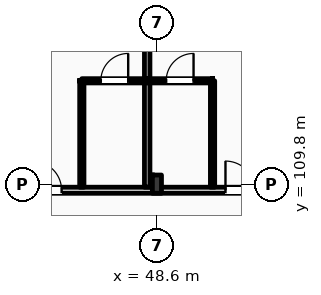
"""IFC4 building model, lengths in metres.
Left out: names, types, materials, properties, quantities, classifications, styles, units other than length and angle.
Written with IfcOpenShell. Run it as: python <this file> out.ifc"""

import sys

from ifc_helpers import new_model, si_unit, direction, frame, frame_2d, origin, origin_2d, place, context, subcontext, project, spatial, rectangle, i_section, extrude, element, fill, save


model = new_model("IFC4")
c1 = context("Model", 3, precision=1e-05, world=origin(), true_north=direction((0.0, 1.0)))
c2 = subcontext(c1, "Body", "Model", "MODEL_VIEW")
j1 = project(units=[si_unit("LENGTHUNIT", "METRE"), si_unit("PLANEANGLEUNIT", "RADIAN")], contexts=[c1])
p1 = place(None, origin())
s1 = spatial("IfcSite", under=j1, at=p1, CompositionType="ELEMENT")
p2 = place(p1, origin())
s2 = spatial("IfcBuilding", under=s1, at=p2, CompositionType="ELEMENT")
p3 = place(p2, frame((0.0, 0.0, 20.4)))
s3 = spatial("IfcBuildingStorey", under=s2, at=p3, CompositionType="ELEMENT", Elevation=20.4)
p4 = place(p3, frame((48.6, 109.8, 0.0), z_axis=(0.0, 0.0, 1.0), x_axis=(1.0, 0.0, 0.0)))
e1 = element("IfcColumn", 1, at=p4, inside=s3, PredefinedType="COLUMN", context=c2, shape_type="SweptSolid", body=[
    extrude(i_section(OverallWidth=0.3, OverallDepth=0.6, WebThickness=0.015, FlangeThickness=0.03, FilletRadius=0.027, at=origin_2d()), origin(), (0.0, 0.0, 1.0), 4.2),
])
p5 = place(p3, frame((10.65, 109.6, 0.0), z_axis=(0.0, 0.0, 1.0), x_axis=(1.0, 0.0, 0.0)))
e2 = element("IfcWall", 2, at=p5, inside=s3, PredefinedType="PARTITIONING", context=c2, shape_type="SweptSolid", body=[
    extrude(rectangle(XDim=109.21, YDim=0.2, at=frame_2d((54.605, 0.0))), origin(), (0.0, 0.0, 1.0), 3.38),
])
p6 = place(p5, frame((12.535, 0.0, 0.0)))
e3 = element("IfcOpeningElement", 3, at=p6, cuts=e2, PredefinedType="OPENING", context=c2, shape_type="SweptSolid", body=[
    extrude(rectangle(XDim=1.02, YDim=2.2, at=frame_2d((0.51, 1.1))), frame((0.0, 0.11, 0.0), z_axis=(0.0, -1.0, 0.0), x_axis=(1.0, 0.0, 0.0)), (0.0, 0.0, 1.0), 0.22),
])
p7 = place(p5, frame((19.175, 0.0, 0.0)))
e4 = element("IfcOpeningElement", 4, at=p7, cuts=e2, PredefinedType="OPENING", context=c2, shape_type="SweptSolid", body=[
    extrude(rectangle(XDim=1.02, YDim=2.2, at=frame_2d((0.51, 1.1))), frame((0.0, 0.11, 0.0), z_axis=(0.0, -1.0, 0.0), x_axis=(1.0, 0.0, 0.0)), (0.0, 0.0, 1.0), 0.22),
])
p8 = place(p5, frame((23.375, 0.0, 0.0)))
e5 = element("IfcOpeningElement", 5, at=p8, cuts=e2, PredefinedType="OPENING", context=c2, shape_type="SweptSolid", body=[
    extrude(rectangle(XDim=1.02, YDim=2.2, at=frame_2d((0.51, 1.1))), frame((0.0, 0.11, 0.0), z_axis=(0.0, -1.0, 0.0), x_axis=(1.0, 0.0, 0.0)), (0.0, 0.0, 1.0), 0.22),
])
p9 = place(p5, frame((27.575, 0.0, 0.0)))
e6 = element("IfcOpeningElement", 6, at=p9, cuts=e2, PredefinedType="OPENING", context=c2, shape_type="SweptSolid", body=[
    extrude(rectangle(XDim=1.02, YDim=2.2, at=frame_2d((0.51, 1.1))), frame((0.0, 0.11, 0.0), z_axis=(0.0, -1.0, 0.0), x_axis=(1.0, 0.0, 0.0)), (0.0, 0.0, 1.0), 0.22),
])
p10 = place(p5, frame((31.805, 0.0, 0.0)))
e7 = element("IfcOpeningElement", 7, at=p10, cuts=e2, PredefinedType="OPENING", context=c2, shape_type="SweptSolid", body=[
    extrude(rectangle(XDim=0.96, YDim=2.2, at=frame_2d((0.48, 1.1))), frame((0.0, 0.11, 0.0), z_axis=(0.0, -1.0, 0.0), x_axis=(1.0, 0.0, 0.0)), (0.0, 0.0, 1.0), 0.22),
])
p11 = place(p5, frame((33.855, 0.0, 0.0)))
e8 = element("IfcOpeningElement", 8, at=p11, cuts=e2, PredefinedType="OPENING", context=c2, shape_type="SweptSolid", body=[
    extrude(rectangle(XDim=0.96, YDim=2.2, at=frame_2d((0.48, 1.1))), frame((0.0, 0.11, 0.0), z_axis=(0.0, -1.0, 0.0), x_axis=(1.0, 0.0, 0.0)), (0.0, 0.0, 1.0), 0.22),
])
p12 = place(p5, frame((40.205, 0.0, 0.0)))
e9 = element("IfcOpeningElement", 9, at=p12, cuts=e2, PredefinedType="OPENING", context=c2, shape_type="SweptSolid", body=[
    extrude(rectangle(XDim=0.96, YDim=2.2, at=frame_2d((0.48, 1.1))), frame((0.0, 0.11, 0.0), z_axis=(0.0, -1.0, 0.0), x_axis=(1.0, 0.0, 0.0)), (0.0, 0.0, 1.0), 0.22),
])
p13 = place(p5, frame((42.255, 0.0, 0.0)))
e10 = element("IfcOpeningElement", 10, at=p13, cuts=e2, PredefinedType="OPENING", context=c2, shape_type="SweptSolid", body=[
    extrude(rectangle(XDim=0.96, YDim=2.2, at=frame_2d((0.48, 1.1))), frame((0.0, 0.11, 0.0), z_axis=(0.0, -1.0, 0.0), x_axis=(1.0, 0.0, 0.0)), (0.0, 0.0, 1.0), 0.22),
])
p14 = place(p5, frame((48.605, 0.0, 0.0)))
e11 = element("IfcOpeningElement", 11, at=p14, cuts=e2, PredefinedType="OPENING", context=c2, shape_type="SweptSolid", body=[
    extrude(rectangle(XDim=0.96, YDim=2.2, at=frame_2d((0.48, 1.1))), frame((0.0, 0.11, 0.0), z_axis=(0.0, -1.0, 0.0), x_axis=(1.0, 0.0, 0.0)), (0.0, 0.0, 1.0), 0.22),
])
p15 = place(p5, frame((50.655, 0.0, 0.0)))
e12 = element("IfcOpeningElement", 12, at=p15, cuts=e2, PredefinedType="OPENING", context=c2, shape_type="SweptSolid", body=[
    extrude(rectangle(XDim=0.96, YDim=2.2, at=frame_2d((0.48, 1.1))), frame((0.0, 0.11, 0.0), z_axis=(0.0, -1.0, 0.0), x_axis=(1.0, 0.0, 0.0)), (0.0, 0.0, 1.0), 0.22),
])
p16 = place(p5, frame((57.005, 0.0, 0.0)))
e13 = element("IfcOpeningElement", 13, at=p16, cuts=e2, PredefinedType="OPENING", context=c2, shape_type="SweptSolid", body=[
    extrude(rectangle(XDim=0.96, YDim=2.2, at=frame_2d((0.48, 1.1))), frame((0.0, 0.11, 0.0), z_axis=(0.0, -1.0, 0.0), x_axis=(1.0, 0.0, 0.0)), (0.0, 0.0, 1.0), 0.22),
])
p17 = place(p5, frame((59.055, 0.0, 0.0)))
e14 = element("IfcOpeningElement", 14, at=p17, cuts=e2, PredefinedType="OPENING", context=c2, shape_type="SweptSolid", body=[
    extrude(rectangle(XDim=0.96, YDim=2.2, at=frame_2d((0.48, 1.1))), frame((0.0, 0.11, 0.0), z_axis=(0.0, -1.0, 0.0), x_axis=(1.0, 0.0, 0.0)), (0.0, 0.0, 1.0), 0.22),
])
p18 = place(p5, frame((65.405, 0.0, 0.0)))
e15 = element("IfcOpeningElement", 15, at=p18, cuts=e2, PredefinedType="OPENING", context=c2, shape_type="SweptSolid", body=[
    extrude(rectangle(XDim=0.96, YDim=2.2, at=frame_2d((0.48, 1.1))), frame((0.0, 0.11, 0.0), z_axis=(0.0, -1.0, 0.0), x_axis=(1.0, 0.0, 0.0)), (0.0, 0.0, 1.0), 0.22),
])
p19 = place(p5, frame((67.205, 0.0, 0.0)))
e16 = element("IfcOpeningElement", 16, at=p19, cuts=e2, PredefinedType="OPENING", context=c2, shape_type="SweptSolid", body=[
    extrude(rectangle(XDim=0.96, YDim=2.2, at=frame_2d((0.48, 1.1))), frame((0.0, 0.11, 0.0), z_axis=(0.0, -1.0, 0.0), x_axis=(1.0, 0.0, 0.0)), (0.0, 0.0, 1.0), 0.22),
])
p20 = place(p5, frame((73.805, 0.0, 0.0)))
e17 = element("IfcOpeningElement", 17, at=p20, cuts=e2, PredefinedType="OPENING", context=c2, shape_type="SweptSolid", body=[
    extrude(rectangle(XDim=0.96, YDim=2.2, at=frame_2d((0.48, 1.1))), frame((0.0, 0.11, 0.0), z_axis=(0.0, -1.0, 0.0), x_axis=(1.0, 0.0, 0.0)), (0.0, 0.0, 1.0), 0.22),
])
p21 = place(p5, frame((78.255, 0.0, 0.0)))
e18 = element("IfcOpeningElement", 18, at=p21, cuts=e2, PredefinedType="OPENING", context=c2, shape_type="SweptSolid", body=[
    extrude(rectangle(XDim=0.96, YDim=2.2, at=frame_2d((0.48, 1.1))), frame((0.0, 0.11, 0.0), z_axis=(0.0, -1.0, 0.0), x_axis=(1.0, 0.0, 0.0)), (0.0, 0.0, 1.0), 0.22),
])
p22 = place(p5, frame((82.205, 0.0, 0.0)))
e19 = element("IfcOpeningElement", 19, at=p22, cuts=e2, PredefinedType="OPENING", context=c2, shape_type="SweptSolid", body=[
    extrude(rectangle(XDim=0.96, YDim=2.2, at=frame_2d((0.48, 1.1))), frame((0.0, 0.11, 0.0), z_axis=(0.0, -1.0, 0.0), x_axis=(1.0, 0.0, 0.0)), (0.0, 0.0, 1.0), 0.22),
])
p23 = place(p5, frame((86.405, 0.0, 0.0)))
e20 = element("IfcOpeningElement", 20, at=p23, cuts=e2, PredefinedType="OPENING", context=c2, shape_type="SweptSolid", body=[
    extrude(rectangle(XDim=0.96, YDim=2.2, at=frame_2d((0.48, 1.1))), frame((0.0, 0.11, 0.0), z_axis=(0.0, -1.0, 0.0), x_axis=(1.0, 0.0, 0.0)), (0.0, 0.0, 1.0), 0.22),
])
p24 = place(p5, frame((90.605, 0.0, 0.0)))
e21 = element("IfcOpeningElement", 21, at=p24, cuts=e2, PredefinedType="OPENING", context=c2, shape_type="SweptSolid", body=[
    extrude(rectangle(XDim=0.96, YDim=2.2, at=frame_2d((0.48, 1.1))), frame((0.0, 0.11, 0.0), z_axis=(0.0, -1.0, 0.0), x_axis=(1.0, 0.0, 0.0)), (0.0, 0.0, 1.0), 0.22),
])
p25 = place(p5, frame((94.805, 0.0, 0.0)))
e22 = element("IfcOpeningElement", 22, at=p25, cuts=e2, PredefinedType="OPENING", context=c2, shape_type="SweptSolid", body=[
    extrude(rectangle(XDim=0.96, YDim=2.2, at=frame_2d((0.48, 1.1))), frame((0.0, 0.11, 0.0), z_axis=(0.0, -1.0, 0.0), x_axis=(1.0, 0.0, 0.0)), (0.0, 0.0, 1.0), 0.22),
])
p26 = place(p5, frame((99.005, 0.0, 0.0)))
e23 = element("IfcOpeningElement", 23, at=p26, cuts=e2, PredefinedType="OPENING", context=c2, shape_type="SweptSolid", body=[
    extrude(rectangle(XDim=0.96, YDim=2.2, at=frame_2d((0.48, 1.1))), frame((0.0, 0.11, 0.0), z_axis=(0.0, -1.0, 0.0), x_axis=(1.0, 0.0, 0.0)), (0.0, 0.0, 1.0), 0.22),
])
p27 = place(p5, frame((103.205, 0.0, 0.0)))
e24 = element("IfcOpeningElement", 24, at=p27, cuts=e2, PredefinedType="OPENING", context=c2, shape_type="SweptSolid", body=[
    extrude(rectangle(XDim=0.96, YDim=2.2, at=frame_2d((0.48, 1.1))), frame((0.0, 0.11, 0.0), z_axis=(0.0, -1.0, 0.0), x_axis=(1.0, 0.0, 0.0)), (0.0, 0.0, 1.0), 0.22),
])
p28 = place(p5, frame((105.335, 0.0, 0.0)))
e25 = element("IfcOpeningElement", 25, at=p28, cuts=e2, PredefinedType="OPENING", context=c2, shape_type="SweptSolid", body=[
    extrude(rectangle(XDim=0.96, YDim=2.2, at=frame_2d((0.48, 1.1))), frame((0.0, 0.11, 0.0), z_axis=(0.0, -1.0, 0.0), x_axis=(1.0, 0.0, 0.0)), (0.0, 0.0, 1.0), 0.22),
])
p29 = place(p5, frame((2.716, 0.0, 0.0)))
e26 = element("IfcOpeningElement", 26, at=p29, cuts=e2, PredefinedType="OPENING", context=c2, shape_type="SweptSolid", body=[
    extrude(rectangle(XDim=1.35, YDim=2.25, at=frame_2d((0.675, 1.125))), frame((0.0, 0.11, 0.0), z_axis=(0.0, -1.0, 0.0), x_axis=(1.0, 0.0, 0.0)), (0.0, 0.0, 1.0), 0.22),
])
p30 = place(p5, frame((6.65, 0.0, 0.0)))
e27 = element("IfcOpeningElement", 27, at=p30, cuts=e2, PredefinedType="OPENING", context=c2, shape_type="SweptSolid", body=[
    extrude(rectangle(XDim=1.35, YDim=2.25, at=frame_2d((0.675, 1.125))), frame((0.0, 0.11, 0.0), z_axis=(0.0, -1.0, 0.0), x_axis=(1.0, 0.0, 0.0)), (0.0, 0.0, 1.0), 0.22),
])
p31 = place(p5, frame((10.583, 0.0, 0.0)))
e28 = element("IfcOpeningElement", 28, at=p31, cuts=e2, PredefinedType="OPENING", context=c2, shape_type="SweptSolid", body=[
    extrude(rectangle(XDim=1.35, YDim=2.25, at=frame_2d((0.675, 1.125))), frame((0.0, 0.11, 0.0), z_axis=(0.0, -1.0, 0.0), x_axis=(1.0, 0.0, 0.0)), (0.0, 0.0, 1.0), 0.22),
])
p32 = place(p3, frame((48.28, 109.7, 0.0), z_axis=(0.0, 0.0, 1.0), x_axis=(0.0, 1.0, 0.0)))
e29 = element("IfcWall", 29, at=p32, inside=s3, PredefinedType="PARTITIONING", context=c2, shape_type="SweptSolid", body=[
    extrude(rectangle(XDim=8.15, YDim=0.18, at=frame_2d((4.075, 0.0))), origin(), (0.0, 0.0, 1.0), 3.94),
])
p33 = place(p3, frame((46.13, 109.7, 0.0), z_axis=(0.0, 0.0, 1.0), x_axis=(0.0, 1.0, 0.0)))
e30 = element("IfcWall", 30, at=p33, inside=s3, PredefinedType="PARTITIONING", context=c2, shape_type="SweptSolid", body=[
    extrude(rectangle(XDim=3.5, YDim=0.14, at=frame_2d((1.75, 0.0))), origin(), (0.0, 0.0, 1.0), 3.63),
])
p34 = place(p3, frame((46.13, 113.2, 0.0), z_axis=(0.0, 0.0, 1.0), x_axis=(1.0, 0.0, 0.0)))
e31 = element("IfcWall", 31, at=p34, inside=s3, PredefinedType="PARTITIONING", context=c2, shape_type="SweptSolid", body=[
    extrude(rectangle(XDim=2.15, YDim=0.14, at=frame_2d((1.075, 0.0))), origin(), (0.0, 0.0, 1.0), 3.94),
])
p35 = place(p34, frame((0.625, 0.0, 0.0)))
e32 = element("IfcOpeningElement", 32, at=p35, cuts=e31, PredefinedType="OPENING", context=c2, shape_type="SweptSolid", body=[
    extrude(rectangle(XDim=0.9, YDim=2.1, at=frame_2d((0.45, 1.05))), frame((0.0, 0.08, 0.0), z_axis=(0.0, -1.0, 0.0), x_axis=(1.0, 0.0, 0.0)), (0.0, 0.0, 1.0), 0.16),
])
p36 = place(p3, frame((50.43, 109.7, 0.0), z_axis=(0.0, 0.0, 1.0), x_axis=(0.0, 1.0, 0.0)))
e33 = element("IfcWall", 33, at=p36, inside=s3, PredefinedType="PARTITIONING", context=c2, shape_type="SweptSolid", body=[
    extrude(rectangle(XDim=3.5, YDim=0.14, at=frame_2d((1.75, 0.0))), origin(), (0.0, 0.0, 1.0), 3.94),
])
p37 = place(p3, frame((48.28, 113.2, 0.0), z_axis=(0.0, 0.0, 1.0), x_axis=(1.0, 0.0, 0.0)))
e34 = element("IfcWall", 34, at=p37, inside=s3, PredefinedType="PARTITIONING", context=c2, shape_type="SweptSolid", body=[
    extrude(rectangle(XDim=2.15, YDim=0.14, at=frame_2d((1.075, 0.0))), origin(), (0.0, 0.0, 1.0), 3.94),
])
p38 = place(p37, frame((0.625, 0.0, 0.0)))
e35 = element("IfcOpeningElement", 35, at=p38, cuts=e34, PredefinedType="OPENING", context=c2, shape_type="SweptSolid", body=[
    extrude(rectangle(XDim=0.9, YDim=2.1, at=frame_2d((0.45, 1.05))), frame((0.0, 0.08, 0.0), z_axis=(0.0, -1.0, 0.0), x_axis=(1.0, 0.0, 0.0)), (0.0, 0.0, 1.0), 0.16),
])
p39 = place(p11, origin())
e36 = element("IfcDoor", 36, at=p39, inside=s3, OperationType="SINGLE_SWING_LEFT", PredefinedType="DOOR", context=c2, shape_type="SweptSolid", body=[
    extrude(rectangle(XDim=0.96, YDim=2.2, at=frame_2d((0.48, 1.1))), frame((0.0, 0.025, 0.0), z_axis=(0.0, -1.0, 0.0), x_axis=(1.0, 0.0, 0.0)), (0.0, 0.0, 1.0), 0.05),
])
fill(e8, e36)
p40 = place(p35, origin())
e37 = element("IfcDoor", 37, at=p40, inside=s3, OperationType="SINGLE_SWING_RIGHT", PredefinedType="DOOR", context=c2, shape_type="SweptSolid", body=[
    extrude(rectangle(XDim=0.9, YDim=2.1, at=frame_2d((0.45, 1.05))), frame((0.0, 0.025, 0.0), z_axis=(0.0, -1.0, 0.0), x_axis=(1.0, 0.0, 0.0)), (0.0, 0.0, 1.0), 0.05),
])
fill(e32, e37)
p41 = place(p12, origin())
e38 = element("IfcDoor", 38, at=p41, inside=s3, OperationType="SINGLE_SWING_LEFT", PredefinedType="DOOR", context=c2, shape_type="SweptSolid", body=[
    extrude(rectangle(XDim=0.96, YDim=2.2, at=frame_2d((0.48, 1.1))), frame((0.0, 0.025, 0.0), z_axis=(0.0, -1.0, 0.0), x_axis=(1.0, 0.0, 0.0)), (0.0, 0.0, 1.0), 0.05),
])
fill(e9, e38)
p42 = place(p38, origin())
e39 = element("IfcDoor", 39, at=p42, inside=s3, OperationType="SINGLE_SWING_RIGHT", PredefinedType="DOOR", context=c2, shape_type="SweptSolid", body=[
    extrude(rectangle(XDim=0.9, YDim=2.1, at=frame_2d((0.45, 1.05))), frame((0.0, 0.025, 0.0), z_axis=(0.0, -1.0, 0.0), x_axis=(1.0, 0.0, 0.0)), (0.0, 0.0, 1.0), 0.05),
])
fill(e35, e39)
save(model, sys.argv[1])
